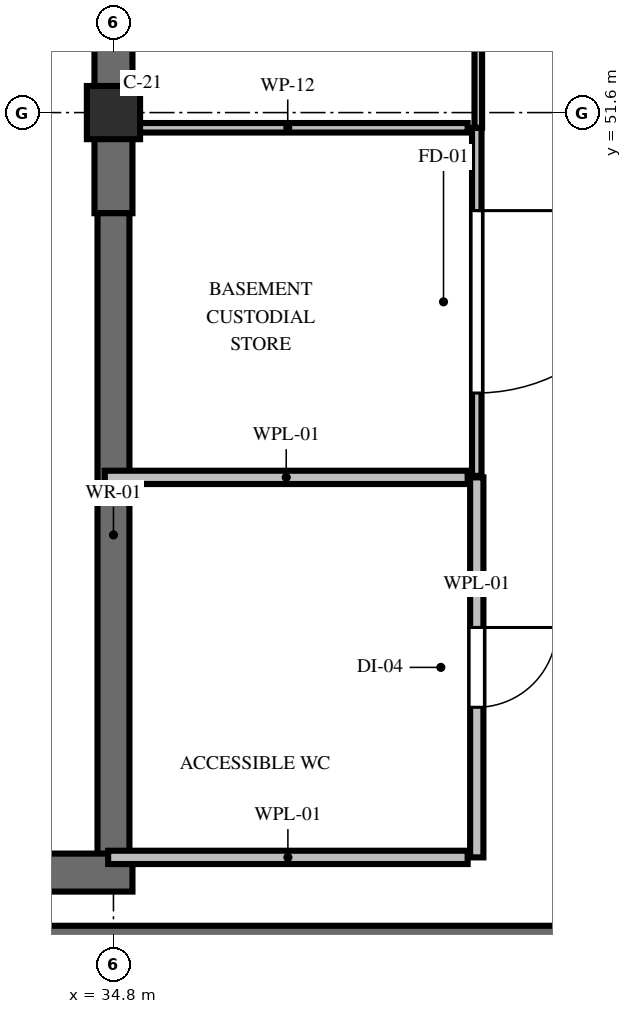
"""IFC4 building model, lengths in metres.
Left out: names, types, materials, properties, quantities, classifications, styles, units other than length and angle.
Written with IfcOpenShell. Run it as: python <this file> out.ifc"""

import sys

from ifc_helpers import new_model, si_unit, direction, frame, frame_2d, origin, origin_2d, place, context, subcontext, project, spatial, polyline, rectangle, hollow_rectangle, outline, extrude, element, fill, save


model = new_model("IFC4")
c1 = context("Model", 3, precision=1e-05, world=origin(), true_north=direction((0.0, 1.0)))
c2 = subcontext(c1, "Body", "Model", "MODEL_VIEW")
j1 = project(units=[si_unit("LENGTHUNIT", "METRE"), si_unit("PLANEANGLEUNIT", "RADIAN")], contexts=[c1])
p1 = place(None, origin())
s1 = spatial("IfcSite", under=j1, at=p1, CompositionType="ELEMENT")
p2 = place(p1, origin())
s2 = spatial("IfcBuilding", under=s1, at=p2, CompositionType="ELEMENT")
p3 = place(p2, frame((0.0, 0.0, -4.8)))
s3 = spatial("IfcBuildingStorey", under=s2, at=p3, CompositionType="ELEMENT", Elevation=-4.8)
p4 = place(p3, frame((14.0, 40.75, 0.0), z_axis=(0.0, 0.0, 1.0), x_axis=(1.0, 0.0, 0.0)))
e1 = element("IfcWall", 1, at=p4, inside=s3, PredefinedType="SHEAR", context=c2, shape_type="SweptSolid", body=[
    extrude(outline(polyline([(0.0, 0.0), (30.0, 0.0), (30.0, 0.25), (0.0, 4.48), (0.0, 0.0)])), frame((0.0, 0.15, 0.0), z_axis=(0.0, -1.0, 0.0), x_axis=(1.0, 0.0, 0.0)), (0.0, 0.0, 1.0), 0.3),
])
p5 = place(p3, frame((34.8, 51.6, 0.0), z_axis=(0.0, 0.0, 1.0), x_axis=(1.0, 0.0, 0.0)))
e2 = element("IfcColumn", 2, at=p5, inside=s3, PredefinedType="COLUMN", context=c2, shape_type="SweptSolid", body=[
    extrude(hollow_rectangle(XDim=0.7, YDim=0.7, WallThickness=0.028, InnerFilletRadius=0.028, OuterFilletRadius=0.056, at=origin_2d()), origin(), (0.0, 0.0, 1.0), 4.8),
])
p6 = place(p3, frame((34.8, 58.952, 0.0), z_axis=(0.0, 0.0, 1.0), x_axis=(0.0, -1.0, 0.0)))
e3 = element("IfcWall", 3, at=p6, inside=s3, PredefinedType="USERDEFINED", context=c2, shape_type="SweptSolid", body=[
    extrude(rectangle(XDim=8.676, YDim=0.5, at=frame_2d((4.338, 0.0))), origin(), (0.0, 0.0, 1.0), 4.32),
])
p7 = place(p3, frame((34.8, 50.276, 0.0), z_axis=(0.0, 0.0, 1.0), x_axis=(0.0, -1.0, 0.0)))
e4 = element("IfcWall", 4, at=p7, inside=s3, PredefinedType="USERDEFINED", context=c2, shape_type="SweptSolid", body=[
    extrude(rectangle(XDim=8.466, YDim=0.42, at=frame_2d((4.233, 0.0))), origin(), (0.0, 0.0, 1.0), 4.32),
])
p8 = place(p3, frame((35.05, 41.6, 0.0), z_axis=(0.0, 0.0, 1.0), x_axis=(-1.0, 0.0, 0.0)))
e5 = element("IfcWall", 5, at=p8, inside=s3, PredefinedType="USERDEFINED", context=c2, shape_type="SweptSolid", body=[
    extrude(rectangle(XDim=10.75, YDim=0.5, at=frame_2d((5.375, 0.0))), origin(), (0.0, 0.0, 1.0), 4.32),
])
p9 = place(p3, frame((39.58, 46.8, 0.0), z_axis=(0.0, 0.0, 1.0), x_axis=(0.0, -1.0, 0.0)))
e6 = element("IfcWall", 6, at=p9, inside=s3, PredefinedType="PLUMBINGWALL", context=c2, shape_type="SweptSolid", body=[
    extrude(rectangle(XDim=5.0, YDim=0.175, at=frame_2d((2.5, 0.0))), origin(), (0.0, 0.0, 1.0), 4.45),
])
p10 = place(p9, frame((1.975, 0.0, 0.0)))
e7 = element("IfcOpeningElement", 7, at=p10, cuts=e6, PredefinedType="OPENING", context=c2, shape_type="SweptSolid", body=[
    extrude(rectangle(XDim=1.05, YDim=2.15, at=frame_2d((0.525, 1.075))), frame((0.0, 0.097, 0.0), z_axis=(0.0, -1.0, 0.0), x_axis=(1.0, 0.0, 0.0)), (0.0, 0.0, 1.0), 0.195),
])
p11 = place(p3, frame((39.46, 41.8, 0.0), z_axis=(0.0, 0.0, 1.0), x_axis=(-1.0, 0.0, 0.0)))
e8 = element("IfcWall", 8, at=p11, inside=s3, PredefinedType="PLUMBINGWALL", context=c2, shape_type="SweptSolid", body=[
    extrude(rectangle(XDim=4.73, YDim=0.175, at=frame_2d((2.365, 0.0))), origin(), (0.0, 0.0, 1.0), 4.45),
])
p12 = place(p3, frame((34.686, 46.8, 0.0), z_axis=(0.0, 0.0, 1.0), x_axis=(1.0, 0.0, 0.0)))
e9 = element("IfcWall", 9, at=p12, inside=s3, PredefinedType="PLUMBINGWALL", context=c2, shape_type="SweptSolid", body=[
    extrude(rectangle(XDim=4.774, YDim=0.175, at=frame_2d((2.387, 0.0))), origin(), (0.0, 0.0, 1.0), 4.45),
])
p13 = place(p3, frame((39.58, 51.4, 0.0), z_axis=(0.0, 0.0, 1.0), x_axis=(0.0, -1.0, 0.0)))
e10 = element("IfcWall", 10, at=p13, inside=s3, PredefinedType="PARTITIONING", context=c2, shape_type="SweptSolid", body=[
    extrude(rectangle(XDim=4.58, YDim=0.125, at=frame_2d((2.29, 0.0))), origin(), (0.0, 0.0, 1.0), 3.72),
])
p14 = place(p13, frame((1.09, 0.0, 0.0)))
e11 = element("IfcOpeningElement", 11, at=p14, cuts=e10, PredefinedType="OPENING", context=c2, shape_type="SweptSolid", body=[
    extrude(rectangle(XDim=2.4, YDim=2.3, at=frame_2d((1.2, 1.15))), frame((0.0, 0.073, 0.0), z_axis=(0.0, -1.0, 0.0), x_axis=(1.0, 0.0, 0.0)), (0.0, 0.0, 1.0), 0.145),
])
p15 = place(p3, frame((34.726, 51.4, 0.0), z_axis=(0.0, 0.0, 1.0), x_axis=(1.0, 0.0, 0.0)))
e12 = element("IfcWall", 12, at=p15, inside=s3, PredefinedType="PARTITIONING", context=c2, shape_type="SweptSolid", body=[
    extrude(rectangle(XDim=4.734, YDim=0.125, at=frame_2d((2.367, 0.0))), origin(), (0.0, 0.0, 1.0), 3.72),
])
p16 = place(p3, frame((39.6, 51.4, 0.0), z_axis=(0.0, 0.0, 1.0), x_axis=(0.0, 1.0, 0.0)))
e13 = element("IfcWall", 13, at=p16, inside=s3, PredefinedType="PARTITIONING", context=c2, shape_type="SweptSolid", body=[
    extrude(rectangle(XDim=29.36, YDim=0.1, at=frame_2d((14.68, 0.0))), origin(), (0.0, 0.0, 1.0), 3.72),
])
p17 = place(p10, origin())
e14 = element("IfcDoor", 14, at=p17, inside=s3, OperationType="SINGLE_SWING_LEFT", PredefinedType="DOOR", context=c2, shape_type="SweptSolid", body=[
    extrude(rectangle(XDim=1.05, YDim=2.15, at=frame_2d((0.525, 1.075))), frame((0.0, 0.025, 0.0), z_axis=(0.0, -1.0, 0.0), x_axis=(1.0, 0.0, 0.0)), (0.0, 0.0, 1.0), 0.05),
])
fill(e7, e14)
p18 = place(p14, origin())
e15 = element("IfcDoor", 15, at=p18, inside=s3, OperationType="FOLDING_TO_LEFT", PredefinedType="DOOR", context=c2, shape_type="SweptSolid", body=[
    extrude(rectangle(XDim=2.4, YDim=2.3, at=frame_2d((1.2, 1.15))), frame((0.0, 0.025, 0.0), z_axis=(0.0, -1.0, 0.0), x_axis=(1.0, 0.0, 0.0)), (0.0, 0.0, 1.0), 0.05),
])
fill(e11, e15)
save(model, sys.argv[1])
